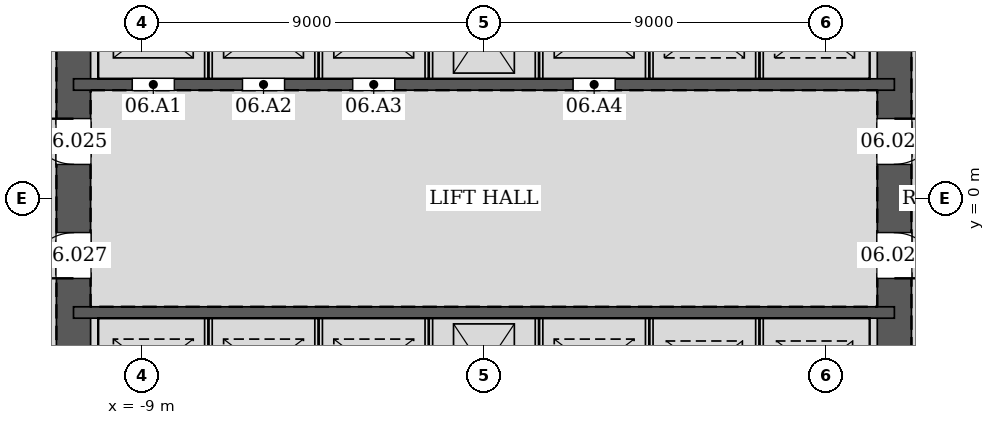
"""IFC4 building model, lengths in metres.
Left out: names, types, materials, properties, quantities, classifications, styles, units other than length and angle.
Written with IfcOpenShell. Run it as: python <this file> out.ifc"""

import sys

from ifc_helpers import new_model, si_unit, direction, frame, frame_2d, origin, place, context, subcontext, project, spatial, rectangle, extrude, element, fill, save


model = new_model("IFC4")
c1 = context("Model", 3, precision=1e-05, world=origin(), true_north=direction((0.0, 1.0)))
c2 = subcontext(c1, "Body", "Model", "MODEL_VIEW")
j1 = project(units=[si_unit("LENGTHUNIT", "METRE"), si_unit("PLANEANGLEUNIT", "RADIAN")], contexts=[c1])
p1 = place(None, origin())
s1 = spatial("IfcSite", under=j1, at=p1, CompositionType="ELEMENT")
p2 = place(p1, origin())
s2 = spatial("IfcBuilding", under=s1, at=p2, CompositionType="ELEMENT")
p3 = place(p2, frame((0.0, 0.0, 33.0)))
s3 = spatial("IfcBuildingStorey", under=s2, at=p3, CompositionType="ELEMENT", Elevation=33.0)
p4 = place(p3, frame((10.8, -10.8, 0.0), z_axis=(0.0, 0.0, 1.0), x_axis=(0.0, 1.0, 0.0)))
e1 = element("IfcWall", 1, at=p4, inside=s3, PredefinedType="SOLIDWALL", context=c2, shape_type="SweptSolid", body=[
    extrude(rectangle(XDim=21.6, YDim=0.9, at=frame_2d((10.8, 0.0))), origin(), (0.0, 0.0, 1.0), 4.2),
])
p5 = place(p4, frame((11.7, 0.0, 0.0)))
e2 = element("IfcOpeningElement", 2, at=p5, cuts=e1, PredefinedType="OPENING", context=c2, shape_type="SweptSolid", body=[
    extrude(rectangle(XDim=1.2, YDim=2.1, at=frame_2d((0.6, 1.05))), frame((0.0, 0.46, 0.0), z_axis=(0.0, -1.0, 0.0), x_axis=(1.0, 0.0, 0.0)), (0.0, 0.0, 1.0), 0.92),
])
p6 = place(p4, frame((8.7, 0.0, 0.0)))
e3 = element("IfcOpeningElement", 3, at=p6, cuts=e1, PredefinedType="OPENING", context=c2, shape_type="SweptSolid", body=[
    extrude(rectangle(XDim=1.2, YDim=2.1, at=frame_2d((0.6, 1.05))), frame((0.0, 0.46, 0.0), z_axis=(0.0, -1.0, 0.0), x_axis=(1.0, 0.0, 0.0)), (0.0, 0.0, 1.0), 0.92),
])
p7 = place(p3, frame((-10.8, 10.8, 0.0), z_axis=(0.0, 0.0, 1.0), x_axis=(0.0, -1.0, 0.0)))
e4 = element("IfcWall", 4, at=p7, inside=s3, PredefinedType="SOLIDWALL", context=c2, shape_type="SweptSolid", body=[
    extrude(rectangle(XDim=21.6, YDim=0.9, at=frame_2d((10.8, 0.0))), origin(), (0.0, 0.0, 1.0), 4.2),
])
p8 = place(p7, frame((8.7, 0.0, 0.0)))
e5 = element("IfcOpeningElement", 5, at=p8, cuts=e4, PredefinedType="OPENING", context=c2, shape_type="SweptSolid", body=[
    extrude(rectangle(XDim=1.2, YDim=2.1, at=frame_2d((0.6, 1.05))), frame((0.0, 0.46, 0.0), z_axis=(0.0, -1.0, 0.0), x_axis=(1.0, 0.0, 0.0)), (0.0, 0.0, 1.0), 0.92),
])
p9 = place(p7, frame((11.7, 0.0, 0.0)))
e6 = element("IfcOpeningElement", 6, at=p9, cuts=e4, PredefinedType="OPENING", context=c2, shape_type="SweptSolid", body=[
    extrude(rectangle(XDim=1.2, YDim=2.1, at=frame_2d((0.6, 1.05))), frame((0.0, 0.46, 0.0), z_axis=(0.0, -1.0, 0.0), x_axis=(1.0, 0.0, 0.0)), (0.0, 0.0, 1.0), 0.92),
])
p10 = place(p3, frame((-10.8, 3.0, 0.0), z_axis=(0.0, 0.0, 1.0), x_axis=(1.0, 0.0, 0.0)))
e7 = element("IfcWall", 7, at=p10, inside=s3, PredefinedType="SOLIDWALL", context=c2, shape_type="SweptSolid", body=[
    extrude(rectangle(XDim=21.6, YDim=0.3, at=frame_2d((10.8, 0.0))), origin(), (0.0, 0.0, 1.0), 4.2),
])
p11 = place(p10, frame((1.55, 0.0, 0.0)))
e8 = element("IfcOpeningElement", 8, at=p11, cuts=e7, PredefinedType="OPENING", context=c2, shape_type="SweptSolid", body=[
    extrude(rectangle(XDim=1.1, YDim=2.1, at=frame_2d((0.55, 1.05))), frame((0.0, 0.16, 0.0), z_axis=(0.0, -1.0, 0.0), x_axis=(1.0, 0.0, 0.0)), (0.0, 0.0, 1.0), 0.32),
])
p12 = place(p10, frame((4.45, 0.0, 0.0)))
e9 = element("IfcOpeningElement", 9, at=p12, cuts=e7, PredefinedType="OPENING", context=c2, shape_type="SweptSolid", body=[
    extrude(rectangle(XDim=1.1, YDim=2.1, at=frame_2d((0.55, 1.05))), frame((0.0, 0.16, 0.0), z_axis=(0.0, -1.0, 0.0), x_axis=(1.0, 0.0, 0.0)), (0.0, 0.0, 1.0), 0.32),
])
p13 = place(p10, frame((7.35, 0.0, 0.0)))
e10 = element("IfcOpeningElement", 10, at=p13, cuts=e7, PredefinedType="OPENING", context=c2, shape_type="SweptSolid", body=[
    extrude(rectangle(XDim=1.1, YDim=2.1, at=frame_2d((0.55, 1.05))), frame((0.0, 0.16, 0.0), z_axis=(0.0, -1.0, 0.0), x_axis=(1.0, 0.0, 0.0)), (0.0, 0.0, 1.0), 0.32),
])
p14 = place(p10, frame((13.15, 0.0, 0.0)))
e11 = element("IfcOpeningElement", 11, at=p14, cuts=e7, PredefinedType="OPENING", context=c2, shape_type="SweptSolid", body=[
    extrude(rectangle(XDim=1.1, YDim=2.1, at=frame_2d((0.55, 1.05))), frame((0.0, 0.16, 0.0), z_axis=(0.0, -1.0, 0.0), x_axis=(1.0, 0.0, 0.0)), (0.0, 0.0, 1.0), 0.32),
])
p15 = place(p3, frame((-10.8, -3.0, 0.0), z_axis=(0.0, 0.0, 1.0), x_axis=(1.0, 0.0, 0.0)))
e12 = element("IfcWall", 12, at=p15, inside=s3, PredefinedType="SOLIDWALL", context=c2, shape_type="SweptSolid", body=[
    extrude(rectangle(XDim=21.6, YDim=0.3, at=frame_2d((10.8, 0.0))), origin(), (0.0, 0.0, 1.0), 4.2),
])
for number, where, z_axis, x_axis in (
    (13, (-7.25, 3.15, 0.0), (0.0, 0.0, 1.0), (0.0, 1.0, 0.0)),
    (14, (-4.35, 3.15, 0.0), (0.0, 0.0, 1.0), (0.0, 1.0, 0.0)),
    (15, (-1.45, 3.15, 0.0), (0.0, 0.0, 1.0), (0.0, 1.0, 0.0)),
    (16, (1.45, 3.15, 0.0), (0.0, 0.0, 1.0), (0.0, 1.0, 0.0)),
    (17, (4.35, 3.15, 0.0), (0.0, 0.0, 1.0), (0.0, 1.0, 0.0)),
    (18, (7.25, 3.15, 0.0), (0.0, 0.0, 1.0), (0.0, 1.0, 0.0)),
    (19, (-7.25, -5.85, 0.0), (0.0, 0.0, 1.0), (0.0, 1.0, 0.0)),
    (20, (-4.35, -5.85, 0.0), (0.0, 0.0, 1.0), (0.0, 1.0, 0.0)),
    (21, (-1.45, -5.85, 0.0), (0.0, 0.0, 1.0), (0.0, 1.0, 0.0)),
    (22, (1.45, -5.85, 0.0), (0.0, 0.0, 1.0), (0.0, 1.0, 0.0)),
    (23, (4.35, -5.85, 0.0), (0.0, 0.0, 1.0), (0.0, 1.0, 0.0)),
    (24, (7.25, -5.85, 0.0), (0.0, 0.0, 1.0), (0.0, 1.0, 0.0)),
):
    element("IfcWall", number, at=place(p3, frame(where, z_axis=z_axis, x_axis=x_axis)), inside=s3, PredefinedType="PARTITIONING", context=c2, shape_type="SweptSolid", body=[
        extrude(rectangle(XDim=2.7, YDim=0.2, at=frame_2d((1.35, 0.0))), origin(), (0.0, 0.0, 1.0), 4.2),
    ])
p16 = place(p5, frame((1.2, 0.0, 0.0), z_axis=(0.0, 0.0, 1.0), x_axis=(-1.0, 0.0, 0.0)))
e25 = element("IfcDoor", 25, at=p16, inside=s3, OperationType="SINGLE_SWING_LEFT", PredefinedType="DOOR", context=c2, shape_type="SweptSolid", body=[
    extrude(rectangle(XDim=1.2, YDim=2.1, at=frame_2d((0.6, 1.05))), frame((0.0, 0.025, 0.0), z_axis=(0.0, -1.0, 0.0), x_axis=(1.0, 0.0, 0.0)), (0.0, 0.0, 1.0), 0.05),
])
fill(e2, e25)
p17 = place(p8, frame((1.2, 0.0, 0.0), z_axis=(0.0, 0.0, 1.0), x_axis=(-1.0, 0.0, 0.0)))
e26 = element("IfcDoor", 26, at=p17, inside=s3, OperationType="SINGLE_SWING_RIGHT", PredefinedType="DOOR", context=c2, shape_type="SweptSolid", body=[
    extrude(rectangle(XDim=1.2, YDim=2.1, at=frame_2d((0.6, 1.05))), frame((0.0, 0.025, 0.0), z_axis=(0.0, -1.0, 0.0), x_axis=(1.0, 0.0, 0.0)), (0.0, 0.0, 1.0), 0.05),
])
fill(e5, e26)
p18 = place(p6, frame((1.2, 0.0, 0.0), z_axis=(0.0, 0.0, 1.0), x_axis=(-1.0, 0.0, 0.0)))
e27 = element("IfcDoor", 27, at=p18, inside=s3, OperationType="SINGLE_SWING_RIGHT", PredefinedType="DOOR", context=c2, shape_type="SweptSolid", body=[
    extrude(rectangle(XDim=1.2, YDim=2.1, at=frame_2d((0.6, 1.05))), frame((0.0, 0.025, 0.0), z_axis=(0.0, -1.0, 0.0), x_axis=(1.0, 0.0, 0.0)), (0.0, 0.0, 1.0), 0.05),
])
fill(e3, e27)
p19 = place(p9, frame((1.2, 0.0, 0.0), z_axis=(0.0, 0.0, 1.0), x_axis=(-1.0, 0.0, 0.0)))
e28 = element("IfcDoor", 28, at=p19, inside=s3, OperationType="SINGLE_SWING_LEFT", PredefinedType="DOOR", context=c2, shape_type="SweptSolid", body=[
    extrude(rectangle(XDim=1.2, YDim=2.1, at=frame_2d((0.6, 1.05))), frame((0.0, 0.025, 0.0), z_axis=(0.0, -1.0, 0.0), x_axis=(1.0, 0.0, 0.0)), (0.0, 0.0, 1.0), 0.05),
])
fill(e6, e28)
p20 = place(p11, origin())
e29 = element("IfcDoor", 29, at=p20, inside=s3, OperationType="DOUBLE_DOOR_SLIDING", PredefinedType="DOOR", context=c2, shape_type="SweptSolid", body=[
    extrude(rectangle(XDim=1.1, YDim=2.1, at=frame_2d((0.55, 1.05))), frame((0.0, 0.025, 0.0), z_axis=(0.0, -1.0, 0.0), x_axis=(1.0, 0.0, 0.0)), (0.0, 0.0, 1.0), 0.05),
])
fill(e8, e29)
p21 = place(p12, origin())
e30 = element("IfcDoor", 30, at=p21, inside=s3, OperationType="DOUBLE_DOOR_SLIDING", PredefinedType="DOOR", context=c2, shape_type="SweptSolid", body=[
    extrude(rectangle(XDim=1.1, YDim=2.1, at=frame_2d((0.55, 1.05))), frame((0.0, 0.025, 0.0), z_axis=(0.0, -1.0, 0.0), x_axis=(1.0, 0.0, 0.0)), (0.0, 0.0, 1.0), 0.05),
])
fill(e9, e30)
p22 = place(p13, origin())
e31 = element("IfcDoor", 31, at=p22, inside=s3, OperationType="DOUBLE_DOOR_SLIDING", PredefinedType="DOOR", context=c2, shape_type="SweptSolid", body=[
    extrude(rectangle(XDim=1.1, YDim=2.1, at=frame_2d((0.55, 1.05))), frame((0.0, 0.025, 0.0), z_axis=(0.0, -1.0, 0.0), x_axis=(1.0, 0.0, 0.0)), (0.0, 0.0, 1.0), 0.05),
])
fill(e10, e31)
p23 = place(p14, origin())
e32 = element("IfcDoor", 32, at=p23, inside=s3, OperationType="DOUBLE_DOOR_SLIDING", PredefinedType="DOOR", context=c2, shape_type="SweptSolid", body=[
    extrude(rectangle(XDim=1.1, YDim=2.1, at=frame_2d((0.55, 1.05))), frame((0.0, 0.025, 0.0), z_axis=(0.0, -1.0, 0.0), x_axis=(1.0, 0.0, 0.0)), (0.0, 0.0, 1.0), 0.05),
])
fill(e11, e32)
save(model, sys.argv[1])
